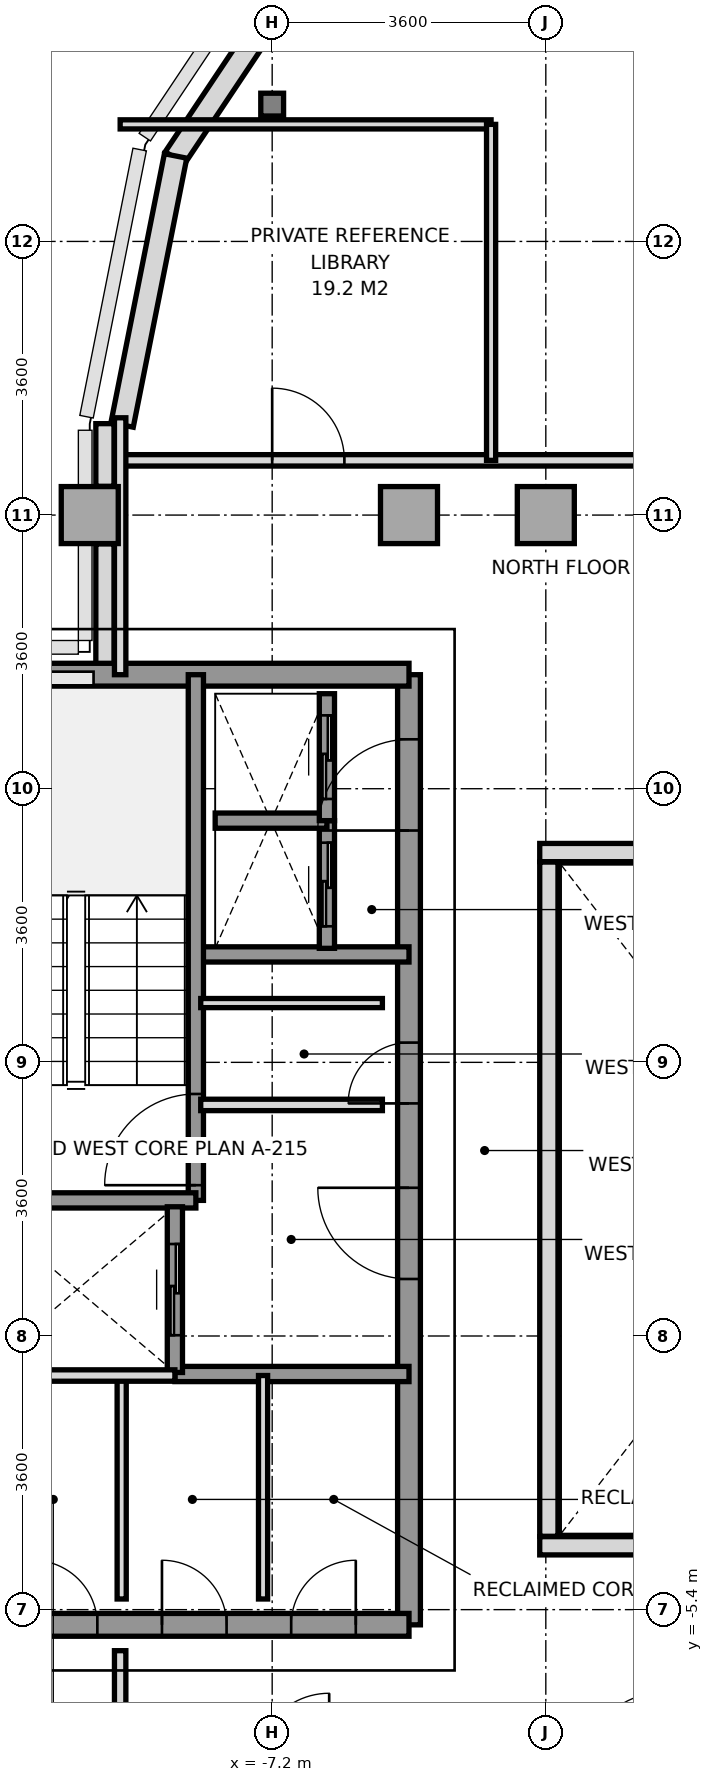
"""IFC4 building model, lengths in metres.
Left out: names, types, materials, properties, quantities, classifications, styles, units other than length and angle.
Written with IfcOpenShell. Run it as: python <this file> out.ifc"""

import sys

from ifc_helpers import new_model, si_unit, direction, frame, frame_2d, origin, origin_2d, place, context, subcontext, project, spatial, rectangle, i_section, extrude, source, transform, mapped, element, fill, save


model = new_model("IFC4")
c1 = context("Model", 3, precision=1e-05, world=origin(), true_north=direction((0.0, 1.0)))
c2 = subcontext(c1, "Body", "Model", "MODEL_VIEW")
j1 = project(units=[si_unit("LENGTHUNIT", "METRE"), si_unit("PLANEANGLEUNIT", "RADIAN")], contexts=[c1])
p1 = place(None, origin())
s1 = spatial("IfcSite", under=j1, at=p1, CompositionType="ELEMENT")
p2 = place(p1, origin())
s2 = spatial("IfcBuilding", under=s1, at=p2, CompositionType="ELEMENT")
p3 = place(p2, frame((0.0, 0.0, 226.8)))
s3 = spatial("IfcBuildingStorey", under=s2, at=p3, CompositionType="ELEMENT", Elevation=226.8)
m1 = source(origin(), c2, "Body", "SweptSolid", [
    extrude(rectangle(XDim=0.75, YDim=0.75, at=origin_2d()), origin(), (0.0, 0.0, 1.0), 3.01),
])
p4 = place(p3, frame((-9.6, 9.0, 0.0), z_axis=(0.0, 0.0, 1.0), x_axis=(1.0, 0.0, 0.0)))
e1 = element("IfcColumn", 1, at=p4, inside=s3, PredefinedType="COLUMN", context=c2, shape_type="MappedRepresentation", body=[
    mapped(m1, transform((0.0, 0.0, 0.0), x_axis=(1.0, 0.0, 0.0), y_axis=(0.0, 1.0, 0.0), z_axis=(0.0, 0.0, 1.0), scale=1.0)),
])
m2 = source(origin(), c2, "Body", "SweptSolid", [
    extrude(i_section(OverallWidth=0.3, OverallDepth=0.3, WebThickness=0.011, FlangeThickness=0.019, at=origin_2d()), origin(), (0.0, 0.0, 1.0), 3.01),
])
p5 = place(p3, frame((-7.2, 14.4, 0.0), z_axis=(0.0, 0.0, 1.0), x_axis=(1.0, 0.0, 0.0)))
e2 = element("IfcColumn", 2, at=p5, inside=s3, PredefinedType="COLUMN", context=c2, shape_type="MappedRepresentation", body=[
    mapped(m2, transform((0.0, 0.0, 0.0), x_axis=(1.0, 0.0, 0.0), y_axis=(0.0, 1.0, 0.0), z_axis=(0.0, 0.0, 1.0), scale=1.0)),
])
for number, where, z_axis, x_axis in (
    (3, (-5.4, 9.0, 0.0), (0.0, 0.0, 1.0), (1.0, 0.0, 0.0)),
    (4, (-3.6, 9.0, 0.0), (0.0, 0.0, 1.0), (1.0, 0.0, 0.0)),
):
    element("IfcColumn", number, at=place(p3, frame(where, z_axis=z_axis, x_axis=x_axis)), inside=s3, PredefinedType="COLUMN", context=c2, shape_type="MappedRepresentation", body=[
        mapped(m1, transform((0.0, 0.0, 0.0), x_axis=(1.0, 0.0, 0.0), y_axis=(0.0, 1.0, 0.0), z_axis=(0.0, 0.0, 1.0), scale=1.0)),
    ])
p6 = place(p3, frame((-7.305, 15.458, 0.0), z_axis=(0.0, 0.0, 1.0), x_axis=(-0.555604299396, -0.831446848868, 0.0)))
e5 = element("IfcWall", 5, at=p6, inside=s3, PredefinedType="SOLIDWALL", context=c2, shape_type="SweptSolid", body=[
    extrude(rectangle(XDim=2.118, YDim=0.3, at=frame_2d((1.059, 0.0))), origin(), (0.0, 0.0, 1.0), 2.61),
])
p7 = place(p3, frame((-8.471, 13.725, 0.0), z_axis=(0.0, 0.0, 1.0), x_axis=(-0.195114232679, -0.980780523974, 0.0)))
e6 = element("IfcWall", 6, at=p7, inside=s3, PredefinedType="SOLIDWALL", context=c2, shape_type="SweptSolid", body=[
    extrude(rectangle(XDim=3.609, YDim=0.3, at=frame_2d((1.804, 0.0))), origin(), (0.0, 0.0, 1.0), 3.01),
])
p8 = place(p3, frame((-9.4, 6.953, 0.0), z_axis=(0.0, 0.0, 1.0), x_axis=(0.0, 1.0, 0.0)))
e7 = element("IfcWall", 7, at=p8, inside=s3, PredefinedType="PARAPET", context=c2, shape_type="SweptSolid", body=[
    extrude(rectangle(XDim=1.669, YDim=0.24, at=frame_2d((0.834, 0.0))), origin(), (0.0, 0.0, 1.0), 1.15),
])
p9 = place(p3, frame((-9.4, 9.378, 0.0), z_axis=(0.0, 0.0, 1.0), x_axis=(0.0, 1.0, 0.0)))
e8 = element("IfcWall", 8, at=p9, inside=s3, PredefinedType="PARAPET", context=c2, shape_type="SweptSolid", body=[
    extrude(rectangle(XDim=0.825, YDim=0.24, at=frame_2d((0.413, 0.0))), origin(), (0.0, 0.0, 1.0), 1.15),
])
p10 = place(p3, frame((-5.4, -5.6, 0.0), z_axis=(0.0, 0.0, 1.0), x_axis=(0.0, 1.0, 0.0)))
e9 = element("IfcWall", 9, at=p10, inside=s3, PredefinedType="SHEAR", context=c2, shape_type="SweptSolid", body=[
    extrude(rectangle(XDim=12.5, YDim=0.3, at=frame_2d((6.25, 0.0))), origin(), (0.0, 0.0, 1.0), 3.01),
])
p11 = place(p10, frame((4.55, 0.0, 0.0)))
e10 = element("IfcOpeningElement", 10, at=p11, cuts=e9, PredefinedType="OPENING", context=c2, shape_type="SweptSolid", body=[
    extrude(rectangle(XDim=1.2, YDim=2.2, at=frame_2d((0.6, 1.1))), frame((0.0, 0.16, 0.0), z_axis=(0.0, -1.0, 0.0), x_axis=(1.0, 0.0, 0.0)), (0.0, 0.0, 1.0), 0.32),
])
p12 = place(p10, frame((10.45, 0.0, 0.0)))
e11 = element("IfcOpeningElement", 11, at=p12, cuts=e9, PredefinedType="OPENING", context=c2, shape_type="SweptSolid", body=[
    extrude(rectangle(XDim=1.2, YDim=2.2, at=frame_2d((0.6, 1.1))), frame((0.0, 0.16, 0.0), z_axis=(0.0, -1.0, 0.0), x_axis=(1.0, 0.0, 0.0)), (0.0, 0.0, 1.0), 0.32),
])
p13 = place(p10, frame((6.86, 0.0, 0.0)))
e12 = element("IfcOpeningElement", 12, at=p13, cuts=e9, PredefinedType="OPENING", context=c2, shape_type="SweptSolid", body=[
    extrude(rectangle(XDim=0.8, YDim=2.1, at=frame_2d((0.4, 1.05))), frame((0.0, 0.16, 0.0), z_axis=(0.0, -1.0, 0.0), x_axis=(1.0, 0.0, 0.0)), (0.0, 0.0, 1.0), 0.32),
])
p14 = place(p3, frame((-11.356, 6.9, 0.0), z_axis=(0.0, 0.0, 1.0), x_axis=(1.0, 0.0, 0.0)))
e13 = element("IfcWall", 13, at=p14, inside=s3, PredefinedType="SHEAR", context=c2, shape_type="SweptSolid", body=[
    extrude(rectangle(XDim=5.956, YDim=0.3, at=frame_2d((2.978, 0.0))), origin(), (0.0, 0.0, 1.0), 3.01),
])
p15 = place(p3, frame((-13.2, -5.6, 0.0), z_axis=(0.0, 0.0, 1.0), x_axis=(1.0, 0.0, 0.0)))
e14 = element("IfcWall", 14, at=p15, inside=s3, PredefinedType="SHEAR", context=c2, shape_type="SweptSolid", body=[
    extrude(rectangle(XDim=7.8, YDim=0.3, at=frame_2d((3.9, 0.0))), origin(), (0.0, 0.0, 1.0), 3.01),
])
p16 = place(p15, frame((0.28, 0.0, 0.0)))
e15 = element("IfcOpeningElement", 15, at=p16, cuts=e14, PredefinedType="OPENING", context=c2, shape_type="SweptSolid", body=[
    extrude(rectangle(XDim=0.85, YDim=2.1, at=frame_2d((0.425, 1.05))), frame((0.0, 0.16, 0.0), z_axis=(0.0, -1.0, 0.0), x_axis=(1.0, 0.0, 0.0)), (0.0, 0.0, 1.0), 0.32),
])
p17 = place(p15, frame((1.36, 0.0, 0.0)))
e16 = element("IfcOpeningElement", 16, at=p17, cuts=e14, PredefinedType="OPENING", context=c2, shape_type="SweptSolid", body=[
    extrude(rectangle(XDim=0.85, YDim=2.1, at=frame_2d((0.425, 1.05))), frame((0.0, 0.16, 0.0), z_axis=(0.0, -1.0, 0.0), x_axis=(1.0, 0.0, 0.0)), (0.0, 0.0, 1.0), 0.32),
])
p18 = place(p15, frame((2.85, 0.0, 0.0)))
e17 = element("IfcOpeningElement", 17, at=p18, cuts=e14, PredefinedType="OPENING", context=c2, shape_type="SweptSolid", body=[
    extrude(rectangle(XDim=0.85, YDim=2.1, at=frame_2d((0.425, 1.05))), frame((0.0, 0.16, 0.0), z_axis=(0.0, -1.0, 0.0), x_axis=(1.0, 0.0, 0.0)), (0.0, 0.0, 1.0), 0.32),
])
p19 = place(p15, frame((4.55, 0.0, 0.0)))
e18 = element("IfcOpeningElement", 18, at=p19, cuts=e14, PredefinedType="OPENING", context=c2, shape_type="SweptSolid", body=[
    extrude(rectangle(XDim=0.85, YDim=2.1, at=frame_2d((0.425, 1.05))), frame((0.0, 0.16, 0.0), z_axis=(0.0, -1.0, 0.0), x_axis=(1.0, 0.0, 0.0)), (0.0, 0.0, 1.0), 0.32),
])
p20 = place(p15, frame((6.25, 0.0, 0.0)))
e19 = element("IfcOpeningElement", 19, at=p20, cuts=e14, PredefinedType="OPENING", context=c2, shape_type="SweptSolid", body=[
    extrude(rectangle(XDim=0.85, YDim=2.1, at=frame_2d((0.425, 1.05))), frame((0.0, 0.16, 0.0), z_axis=(0.0, -1.0, 0.0), x_axis=(1.0, 0.0, 0.0)), (0.0, 0.0, 1.0), 0.32),
])
p21 = place(p3, frame((-8.18, 3.22, 0.0), z_axis=(0.0, 0.0, 1.0), x_axis=(1.0, 0.0, 0.0)))
e20 = element("IfcWall", 20, at=p21, inside=s3, PredefinedType="SOLIDWALL", context=c2, shape_type="SweptSolid", body=[
    extrude(rectangle(XDim=2.78, YDim=0.2, at=frame_2d((1.39, 0.0))), origin(), (0.0, 0.0, 1.0), 3.01),
])
p22 = place(p3, frame((-8.48, -2.3, 0.0), z_axis=(0.0, 0.0, 1.0), x_axis=(1.0, 0.0, 0.0)))
e21 = element("IfcWall", 21, at=p22, inside=s3, PredefinedType="SOLIDWALL", context=c2, shape_type="SweptSolid", body=[
    extrude(rectangle(XDim=3.08, YDim=0.2, at=frame_2d((1.54, 0.0))), origin(), (0.0, 0.0, 1.0), 3.01),
])
p23 = place(p3, frame((-8.204, -0.016, 0.0), z_axis=(0.0, 0.0, 1.0), x_axis=(0.0, 1.0, 0.0)))
e22 = element("IfcWall", 22, at=p23, inside=s3, PredefinedType="SOLIDWALL", context=c2, shape_type="SweptSolid", body=[
    extrude(rectangle(XDim=6.916, YDim=0.2, at=frame_2d((3.458, 0.0))), origin(), (0.0, 0.0, 1.0), 3.01),
])
p24 = place(p23, frame((0.2, 0.0, 0.0)))
e23 = element("IfcOpeningElement", 23, at=p24, cuts=e22, PredefinedType="OPENING", context=c2, shape_type="SweptSolid", body=[
    extrude(rectangle(XDim=1.2, YDim=2.2, at=frame_2d((0.6, 1.1))), frame((0.0, 0.11, 0.0), z_axis=(0.0, -1.0, 0.0), x_axis=(1.0, 0.0, 0.0)), (0.0, 0.0, 1.0), 0.22),
])
p25 = place(p3, frame((-11.356, -0.016, 0.0), z_axis=(0.0, 0.0, 1.0), x_axis=(1.0, 0.0, 0.0)))
e24 = element("IfcWall", 24, at=p25, inside=s3, PredefinedType="SOLIDWALL", context=c2, shape_type="SweptSolid", body=[
    extrude(rectangle(XDim=3.152, YDim=0.2, at=frame_2d((1.576, 0.0))), origin(), (0.0, 0.0, 1.0), 3.01),
])
p26 = place(p3, frame((-8.48, -2.28, 0.0), z_axis=(0.0, 0.0, 1.0), x_axis=(0.0, 1.0, 0.0)))
e25 = element("IfcWall", 25, at=p26, inside=s3, PredefinedType="SOLIDWALL", context=c2, shape_type="SweptSolid", body=[
    extrude(rectangle(XDim=2.18, YDim=0.2, at=frame_2d((1.09, 0.0))), origin(), (0.0, 0.0, 1.0), 3.01),
])
p27 = place(p26, frame((0.49, 0.0, 0.0)))
e26 = element("IfcOpeningElement", 26, at=p27, cuts=e25, PredefinedType="OPENING", context=c2, shape_type="SweptSolid", body=[
    extrude(rectangle(XDim=1.2, YDim=2.2, at=frame_2d((0.6, 1.1))), frame((0.0, 0.11, 0.0), z_axis=(0.0, -1.0, 0.0), x_axis=(1.0, 0.0, 0.0)), (0.0, 0.0, 1.0), 0.22),
])
p28 = place(p3, frame((-6.48, 3.3, 0.0), z_axis=(0.0, 0.0, 1.0), x_axis=(0.0, 1.0, 0.0)))
e27 = element("IfcWall", 27, at=p28, inside=s3, PredefinedType="SOLIDWALL", context=c2, shape_type="SweptSolid", body=[
    extrude(rectangle(XDim=1.68, YDim=0.2, at=frame_2d((0.84, 0.0))), origin(), (0.0, 0.0, 1.0), 3.01),
])
p29 = place(p28, frame((0.29, 0.0, 0.0)))
e28 = element("IfcOpeningElement", 28, at=p29, cuts=e27, PredefinedType="OPENING", context=c2, shape_type="SweptSolid", body=[
    extrude(rectangle(XDim=1.1, YDim=2.2, at=frame_2d((0.55, 1.1))), frame((0.0, 0.11, 0.0), z_axis=(0.0, -1.0, 0.0), x_axis=(1.0, 0.0, 0.0)), (0.0, 0.0, 1.0), 0.22),
])
p30 = place(p3, frame((-7.95, 4.98, 0.0), z_axis=(0.0, 0.0, 1.0), x_axis=(1.0, 0.0, 0.0)))
e29 = element("IfcWall", 29, at=p30, inside=s3, PredefinedType="SOLIDWALL", context=c2, shape_type="SweptSolid", body=[
    extrude(rectangle(XDim=1.47, YDim=0.2, at=frame_2d((0.735, 0.0))), origin(), (0.0, 0.0, 1.0), 3.01),
])
p31 = place(p3, frame((-6.48, 4.98, 0.0), z_axis=(0.0, 0.0, 1.0), x_axis=(0.0, 1.0, 0.0)))
e30 = element("IfcWall", 30, at=p31, inside=s3, PredefinedType="SOLIDWALL", context=c2, shape_type="SweptSolid", body=[
    extrude(rectangle(XDim=1.67, YDim=0.2, at=frame_2d((0.835, 0.0))), origin(), (0.0, 0.0, 1.0), 3.01),
])
p32 = place(p31, frame((0.285, 0.0, 0.0)))
e31 = element("IfcOpeningElement", 31, at=p32, cuts=e30, PredefinedType="OPENING", context=c2, shape_type="SweptSolid", body=[
    extrude(rectangle(XDim=1.1, YDim=2.2, at=frame_2d((0.55, 1.1))), frame((0.0, 0.11, 0.0), z_axis=(0.0, -1.0, 0.0), x_axis=(1.0, 0.0, 0.0)), (0.0, 0.0, 1.0), 0.22),
])
p33 = place(p3, frame((-8.14, 1.24, 0.0), z_axis=(0.0, 0.0, 1.0), x_axis=(1.0, 0.0, 0.0)))
e32 = element("IfcWall", 32, at=p33, inside=s3, PredefinedType="PARTITIONING", context=c2, shape_type="SweptSolid", body=[
    extrude(rectangle(XDim=2.39, YDim=0.15, at=frame_2d((1.195, 0.0))), origin(), (0.0, 0.0, 1.0), 3.01),
])
p34 = place(p3, frame((-8.14, 2.58, 0.0), z_axis=(0.0, 0.0, 1.0), x_axis=(1.0, 0.0, 0.0)))
e33 = element("IfcWall", 33, at=p34, inside=s3, PredefinedType="PARTITIONING", context=c2, shape_type="SweptSolid", body=[
    extrude(rectangle(XDim=2.39, YDim=0.12, at=frame_2d((1.195, 0.0))), origin(), (0.0, 0.0, 1.0), 3.01),
])
for number, where, z_axis, x_axis in (
    (34, (-9.18, -5.26, 0.0), (0.0, 0.0, 1.0), (0.0, 1.0, 0.0)),
    (35, (-7.32, -5.26, 0.0), (0.0, 0.0, 1.0), (0.0, 1.0, 0.0)),
):
    element("IfcWall", number, at=place(p3, frame(where, z_axis=z_axis, x_axis=x_axis)), inside=s3, PredefinedType="PARTITIONING", context=c2, shape_type="SweptSolid", body=[
        extrude(rectangle(XDim=2.94, YDim=0.12, at=frame_2d((1.47, 0.0))), origin(), (0.0, 0.0, 1.0), 3.01),
    ])
p35 = place(p3, frame((-11.04, -2.32, 0.0), z_axis=(0.0, 0.0, 1.0), x_axis=(1.0, 0.0, 0.0)))
e36 = element("IfcWall", 36, at=p35, inside=s3, PredefinedType="PARTITIONING", context=c2, shape_type="SweptSolid", body=[
    extrude(rectangle(XDim=2.56, YDim=0.15, at=frame_2d((1.28, 0.0))), origin(), (0.0, 0.0, 1.0), 3.01),
])
p36 = place(p3, frame((-9.2, 9.72, 0.0), z_axis=(0.0, 0.0, 1.0), x_axis=(1.0, 0.0, 0.0)))
e37 = element("IfcWall", 37, at=p36, inside=s3, PredefinedType="PARTITIONING", context=c2, shape_type="SweptSolid", body=[
    extrude(rectangle(XDim=18.4, YDim=0.15, at=frame_2d((9.2, 0.0))), origin(), (0.0, 0.0, 1.0), 3.01),
])
p37 = place(p36, frame((2.0, 0.0, 0.0)))
e38 = element("IfcOpeningElement", 38, at=p37, cuts=e37, PredefinedType="OPENING", context=c2, shape_type="SweptSolid", body=[
    extrude(rectangle(XDim=0.95, YDim=2.15, at=frame_2d((0.475, 1.075))), frame((0.0, 0.085, 0.0), z_axis=(0.0, -1.0, 0.0), x_axis=(1.0, 0.0, 0.0)), (0.0, 0.0, 1.0), 0.17),
])
p38 = place(p36, frame((15.35, 0.0, 0.0)))
e39 = element("IfcOpeningElement", 39, at=p38, cuts=e37, PredefinedType="OPENING", context=c2, shape_type="SweptSolid", body=[
    extrude(rectangle(XDim=0.95, YDim=2.15, at=frame_2d((0.475, 1.075))), frame((0.0, 0.085, 0.0), z_axis=(0.0, -1.0, 0.0), x_axis=(1.0, 0.0, 0.0)), (0.0, 0.0, 1.0), 0.17),
])
p39 = place(p36, frame((8.8, 0.0, 0.0)))
e40 = element("IfcOpeningElement", 40, at=p39, cuts=e37, PredefinedType="OPENING", context=c2, shape_type="SweptSolid", body=[
    extrude(rectangle(XDim=1.1, YDim=2.2, at=frame_2d((0.55, 1.1))), frame((0.0, 0.085, 0.0), z_axis=(0.0, -1.0, 0.0), x_axis=(1.0, 0.0, 0.0)), (0.0, 0.0, 1.0), 0.17),
])
p40 = place(p3, frame((-9.2, 6.9, 0.0), z_axis=(0.0, 0.0, 1.0), x_axis=(0.0, 1.0, 0.0)))
e41 = element("IfcWall", 41, at=p40, inside=s3, PredefinedType="PARTITIONING", context=c2, shape_type="SweptSolid", body=[
    extrude(rectangle(XDim=3.38, YDim=0.15, at=frame_2d((1.69, 0.0))), origin(), (0.0, 0.0, 1.0), 2.61),
])
p41 = place(p3, frame((-9.2, 14.14, 0.0), z_axis=(0.0, 0.0, 1.0), x_axis=(1.0, 0.0, 0.0)))
e42 = element("IfcWall", 42, at=p41, inside=s3, PredefinedType="PARTITIONING", context=c2, shape_type="SweptSolid", body=[
    extrude(rectangle(XDim=4.88, YDim=0.12, at=frame_2d((2.44, 0.0))), origin(), (0.0, 0.0, 1.0), 3.01),
])
p42 = place(p3, frame((-4.32, 9.72, 0.0), z_axis=(0.0, 0.0, 1.0), x_axis=(0.0, 1.0, 0.0)))
e43 = element("IfcWall", 43, at=p42, inside=s3, PredefinedType="PARTITIONING", context=c2, shape_type="SweptSolid", body=[
    extrude(rectangle(XDim=4.42, YDim=0.12, at=frame_2d((2.21, 0.0))), origin(), (0.0, 0.0, 1.0), 3.01),
])
p43 = place(p3, frame((-9.2, -10.28, 0.0), z_axis=(0.0, 0.0, 1.0), x_axis=(0.0, 1.0, 0.0)))
e44 = element("IfcWall", 44, at=p43, inside=s3, PredefinedType="PARTITIONING", context=c2, shape_type="SweptSolid", body=[
    extrude(rectangle(XDim=4.34, YDim=0.15, at=frame_2d((2.17, 0.0))), origin(), (0.0, 0.0, 1.0), 2.61),
])
for number, where, z_axis, x_axis in (
    (45, (-3.68, -4.56, 0.0), (0.0, 0.0, 1.0), (1.0, 0.0, 0.0)),
    (46, (-3.68, 4.56, 0.0), (0.0, 0.0, 1.0), (1.0, 0.0, 0.0)),
):
    element("IfcWall", number, at=place(p3, frame(where, z_axis=z_axis, x_axis=x_axis)), inside=s3, PredefinedType="PARAPET", context=c2, shape_type="SweptSolid", body=[
        extrude(rectangle(XDim=7.36, YDim=0.24, at=frame_2d((3.68, 0.0))), origin(), (0.0, 0.0, 1.0), 1.15),
    ])
p44 = place(p3, frame((-3.56, -4.435, 0.0), z_axis=(0.0, 0.0, 1.0), x_axis=(0.0, 1.0, 0.0)))
e47 = element("IfcWall", 47, at=p44, inside=s3, PredefinedType="PARAPET", context=c2, shape_type="SweptSolid", body=[
    extrude(rectangle(XDim=8.87, YDim=0.24, at=frame_2d((4.435, 0.0))), origin(), (0.0, 0.0, 1.0), 1.15),
])
m3 = source(origin(), c2, "Body", "SweptSolid", [
    extrude(rectangle(XDim=1.2, YDim=2.2, at=frame_2d((0.6, 1.1))), frame((0.0, 0.025, 0.0), z_axis=(0.0, -1.0, 0.0), x_axis=(1.0, 0.0, 0.0)), (0.0, 0.0, 1.0), 0.05),
])
p45 = place(p24, origin())
e48 = element("IfcDoor", 48, at=p45, inside=s3, OperationType="SINGLE_SWING_LEFT", PredefinedType="DOOR", context=c2, shape_type="MappedRepresentation", body=[
    mapped(m3, transform((0.0, 0.0, 0.0), x_axis=(1.0, 0.0, 0.0), y_axis=(0.0, 1.0, 0.0), z_axis=(0.0, 0.0, 1.0), scale=1.0)),
])
fill(e23, e48)
p46 = place(p11, origin())
e49 = element("IfcDoor", 49, at=p46, inside=s3, OperationType="SINGLE_SWING_RIGHT", PredefinedType="DOOR", context=c2, shape_type="MappedRepresentation", body=[
    mapped(m3, transform((0.0, 0.0, 0.0), x_axis=(1.0, 0.0, 0.0), y_axis=(0.0, 1.0, 0.0), z_axis=(0.0, 0.0, 1.0), scale=1.0)),
])
fill(e10, e49)
p47 = place(p12, origin())
e50 = element("IfcDoor", 50, at=p47, inside=s3, OperationType="SINGLE_SWING_LEFT", PredefinedType="DOOR", context=c2, shape_type="MappedRepresentation", body=[
    mapped(m3, transform((0.0, 0.0, 0.0), x_axis=(1.0, 0.0, 0.0), y_axis=(0.0, 1.0, 0.0), z_axis=(0.0, 0.0, 1.0), scale=1.0)),
])
fill(e11, e50)
m4 = source(origin(), c2, "Body", "SweptSolid", [
    extrude(rectangle(XDim=0.8, YDim=2.1, at=frame_2d((0.4, 1.05))), frame((0.0, 0.025, 0.0), z_axis=(0.0, -1.0, 0.0), x_axis=(1.0, 0.0, 0.0)), (0.0, 0.0, 1.0), 0.05),
])
p48 = place(p13, origin())
e51 = element("IfcDoor", 51, at=p48, inside=s3, OperationType="SINGLE_SWING_LEFT", PredefinedType="DOOR", context=c2, shape_type="MappedRepresentation", body=[
    mapped(m4, transform((0.0, 0.0, 0.0), x_axis=(1.0, 0.0, 0.0), y_axis=(0.0, 1.0, 0.0), z_axis=(0.0, 0.0, 1.0), scale=1.0)),
])
fill(e12, e51)
m5 = source(origin(), c2, "Body", "SweptSolid", [
    extrude(rectangle(XDim=0.85, YDim=2.1, at=frame_2d((0.425, 1.05))), frame((0.0, 0.025, 0.0), z_axis=(0.0, -1.0, 0.0), x_axis=(1.0, 0.0, 0.0)), (0.0, 0.0, 1.0), 0.05),
])
p49 = place(p18, origin())
e52 = element("IfcDoor", 52, at=p49, inside=s3, OperationType="SINGLE_SWING_LEFT", PredefinedType="DOOR", context=c2, shape_type="MappedRepresentation", body=[
    mapped(m5, transform((0.0, 0.0, 0.0), x_axis=(1.0, 0.0, 0.0), y_axis=(0.0, 1.0, 0.0), z_axis=(0.0, 0.0, 1.0), scale=1.0)),
])
fill(e17, e52)
p50 = place(p19, origin())
e53 = element("IfcDoor", 53, at=p50, inside=s3, OperationType="SINGLE_SWING_LEFT", PredefinedType="DOOR", context=c2, shape_type="MappedRepresentation", body=[
    mapped(m5, transform((0.0, 0.0, 0.0), x_axis=(1.0, 0.0, 0.0), y_axis=(0.0, 1.0, 0.0), z_axis=(0.0, 0.0, 1.0), scale=1.0)),
])
fill(e18, e53)
p51 = place(p20, origin())
e54 = element("IfcDoor", 54, at=p51, inside=s3, OperationType="SINGLE_SWING_RIGHT", PredefinedType="DOOR", context=c2, shape_type="MappedRepresentation", body=[
    mapped(m5, transform((0.0, 0.0, 0.0), x_axis=(1.0, 0.0, 0.0), y_axis=(0.0, 1.0, 0.0), z_axis=(0.0, 0.0, 1.0), scale=1.0)),
])
fill(e19, e54)
p52 = place(p27, origin())
e55 = element("IfcDoor", 55, at=p52, inside=s3, OperationType="SLIDING_TO_RIGHT", PredefinedType="DOOR", context=c2, shape_type="MappedRepresentation", body=[
    mapped(m3, transform((0.0, 0.0, 0.0), x_axis=(1.0, 0.0, 0.0), y_axis=(0.0, 1.0, 0.0), z_axis=(0.0, 0.0, 1.0), scale=1.0)),
])
fill(e26, e55)
m6 = source(origin(), c2, "Body", "SweptSolid", [
    extrude(rectangle(XDim=1.1, YDim=2.2, at=frame_2d((0.55, 1.1))), frame((0.0, 0.025, 0.0), z_axis=(0.0, -1.0, 0.0), x_axis=(1.0, 0.0, 0.0)), (0.0, 0.0, 1.0), 0.05),
])
p53 = place(p29, origin())
e56 = element("IfcDoor", 56, at=p53, inside=s3, OperationType="SLIDING_TO_LEFT", PredefinedType="DOOR", context=c2, shape_type="MappedRepresentation", body=[
    mapped(m6, transform((0.0, 0.0, 0.0), x_axis=(1.0, 0.0, 0.0), y_axis=(0.0, 1.0, 0.0), z_axis=(0.0, 0.0, 1.0), scale=1.0)),
])
fill(e28, e56)
p54 = place(p32, origin())
e57 = element("IfcDoor", 57, at=p54, inside=s3, OperationType="SLIDING_TO_LEFT", PredefinedType="DOOR", context=c2, shape_type="MappedRepresentation", body=[
    mapped(m6, transform((0.0, 0.0, 0.0), x_axis=(1.0, 0.0, 0.0), y_axis=(0.0, 1.0, 0.0), z_axis=(0.0, 0.0, 1.0), scale=1.0)),
])
fill(e31, e57)
m7 = source(origin(), c2, "Body", "SweptSolid", [
    extrude(rectangle(XDim=0.95, YDim=2.15, at=frame_2d((0.475, 1.075))), frame((0.0, 0.025, 0.0), z_axis=(0.0, -1.0, 0.0), x_axis=(1.0, 0.0, 0.0)), (0.0, 0.0, 1.0), 0.05),
])
p55 = place(p37, origin())
e58 = element("IfcDoor", 58, at=p55, inside=s3, OperationType="SINGLE_SWING_LEFT", PredefinedType="DOOR", context=c2, shape_type="MappedRepresentation", body=[
    mapped(m7, transform((0.0, 0.0, 0.0), x_axis=(1.0, 0.0, 0.0), y_axis=(0.0, 1.0, 0.0), z_axis=(0.0, 0.0, 1.0), scale=1.0)),
])
fill(e38, e58)
save(model, sys.argv[1])
